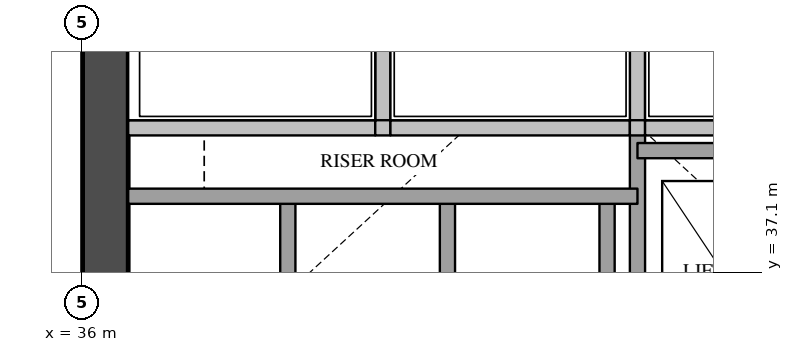
"""IFC4 building model, lengths in metres.
Left out: names, types, materials, properties, quantities, classifications, styles, units other than length and angle.
Written with IfcOpenShell. Run it as: python <this file> out.ifc"""

import sys

from ifc_helpers import new_model, si_unit, direction, frame, frame_2d, origin, place, context, subcontext, project, spatial, rectangle, extrude, element, save


model = new_model("IFC4")
c1 = context("Model", 3, precision=1e-05, world=origin(), true_north=direction((0.0, 1.0)))
c2 = subcontext(c1, "Body", "Model", "MODEL_VIEW")
j1 = project(units=[si_unit("LENGTHUNIT", "METRE"), si_unit("PLANEANGLEUNIT", "RADIAN")], contexts=[c1])
p1 = place(None, origin())
s1 = spatial("IfcSite", under=j1, at=p1, CompositionType="ELEMENT")
p2 = place(p1, origin())
s2 = spatial("IfcBuilding", under=s1, at=p2, CompositionType="ELEMENT")
p3 = place(p2, frame((0.0, 0.0, 42.4)))
s3 = spatial("IfcBuildingStorey", under=s2, at=p3, CompositionType="ELEMENT", Elevation=42.4)
p4 = place(p3, frame((36.3, 29.1, 0.0), z_axis=(0.0, 0.0, 1.0), x_axis=(0.0, 1.0, 0.0)))
e1 = element("IfcWall", 1, at=p4, inside=s3, PredefinedType="SHEAR", context=c2, shape_type="SweptSolid", body=[
    extrude(rectangle(XDim=20.3, YDim=0.6, at=frame_2d((10.15, 0.0))), origin(), (0.0, 0.0, 1.0), 3.5),
])
p5 = place(p4, frame((3.6, 0.0, 0.0)))
e2 = element("IfcOpeningElement", 2, at=p5, cuts=e1, PredefinedType="OPENING", context=c2, shape_type="SweptSolid", body=[
    extrude(rectangle(XDim=1.8, YDim=2.1, at=frame_2d((0.9, 1.05))), frame((0.0, 0.31, 0.0), z_axis=(0.0, -1.0, 0.0), x_axis=(1.0, 0.0, 0.0)), (0.0, 0.0, 1.0), 0.62),
])
p6 = place(p4, frame((16.4, 0.0, 0.0)))
e3 = element("IfcOpeningElement", 3, at=p6, cuts=e1, PredefinedType="OPENING", context=c2, shape_type="SweptSolid", body=[
    extrude(rectangle(XDim=1.0, YDim=2.1, at=frame_2d((0.5, 1.05))), frame((0.0, 0.31, 0.0), z_axis=(0.0, -1.0, 0.0), x_axis=(1.0, 0.0, 0.0)), (0.0, 0.0, 1.0), 0.62),
])
p7 = place(p3, frame((38.7, 34.9, 0.0), z_axis=(0.0, 0.0, 1.0), x_axis=(0.0, 1.0, 0.0)))
e4 = element("IfcWall", 4, at=p7, inside=s3, PredefinedType="SOLIDWALL", context=c2, shape_type="SweptSolid", body=[
    extrude(rectangle(XDim=3.2, YDim=0.2, at=frame_2d((1.6, 0.0))), origin(), (0.0, 0.0, 1.0), 3.5),
])
p8 = place(p3, frame((39.95, 39.0, 0.0), z_axis=(0.0, 0.0, 1.0), x_axis=(0.0, 1.0, 0.0)))
e5 = element("IfcWall", 5, at=p8, inside=s3, PredefinedType="SOLIDWALL", context=c2, shape_type="SweptSolid", body=[
    extrude(rectangle(XDim=1.78, YDim=0.2, at=frame_2d((0.89, 0.0))), origin(), (0.0, 0.0, 1.0), 3.5),
])
for number, where, z_axis, x_axis in (
    (6, (40.8, 34.9, 0.0), (0.0, 0.0, 1.0), (0.0, 1.0, 0.0)),
    (7, (42.9, 34.9, 0.0), (0.0, 0.0, 1.0), (0.0, 1.0, 0.0)),
):
    element("IfcWall", number, at=place(p3, frame(where, z_axis=z_axis, x_axis=x_axis)), inside=s3, PredefinedType="SOLIDWALL", context=c2, shape_type="SweptSolid", body=[
        extrude(rectangle(XDim=3.2, YDim=0.2, at=frame_2d((1.6, 0.0))), origin(), (0.0, 0.0, 1.0), 3.5),
    ])
p9 = place(p3, frame((43.3, 29.1, 0.0), z_axis=(0.0, 0.0, 1.0), x_axis=(0.0, 1.0, 0.0)))
e8 = element("IfcWall", 8, at=p9, inside=s3, PredefinedType="SOLIDWALL", context=c2, shape_type="SweptSolid", body=[
    extrude(rectangle(XDim=9.9, YDim=0.2, at=frame_2d((4.95, 0.0))), origin(), (0.0, 0.0, 1.0), 3.5),
])
p10 = place(p3, frame((43.3, 39.0, 0.0), z_axis=(0.0, 0.0, 1.0), x_axis=(0.0, 1.0, 0.0)))
e9 = element("IfcWall", 9, at=p10, inside=s3, PredefinedType="SOLIDWALL", context=c2, shape_type="SweptSolid", body=[
    extrude(rectangle(XDim=1.78, YDim=0.2, at=frame_2d((0.89, 0.0))), origin(), (0.0, 0.0, 1.0), 3.5),
])
p11 = place(p3, frame((36.6, 38.1, 0.0), z_axis=(0.0, 0.0, 1.0), x_axis=(1.0, 0.0, 0.0)))
e10 = element("IfcWall", 10, at=p11, inside=s3, PredefinedType="SOLIDWALL", context=c2, shape_type="SweptSolid", body=[
    extrude(rectangle(XDim=6.7, YDim=0.2, at=frame_2d((3.35, 0.0))), origin(), (0.0, 0.0, 1.0), 3.5),
])
p12 = place(p3, frame((43.3, 38.7, 0.0), z_axis=(0.0, 0.0, 1.0), x_axis=(1.0, 0.0, 0.0)))
e11 = element("IfcWall", 11, at=p12, inside=s3, PredefinedType="SOLIDWALL", context=c2, shape_type="SweptSolid", body=[
    extrude(rectangle(XDim=4.5, YDim=0.2, at=frame_2d((2.25, 0.0))), origin(), (0.0, 0.0, 1.0), 3.5),
])
p13 = place(p3, frame((36.6, 39.0, 0.0), z_axis=(0.0, 0.0, 1.0), x_axis=(1.0, 0.0, 0.0)))
e12 = element("IfcWall", 12, at=p13, inside=s3, PredefinedType="SOLIDWALL", context=c2, shape_type="SweptSolid", body=[
    extrude(rectangle(XDim=3.25, YDim=0.2, at=frame_2d((1.625, 0.0))), origin(), (0.0, 0.0, 1.0), 3.5),
])
p14 = place(p3, frame((39.85, 39.0, 0.0), z_axis=(0.0, 0.0, 1.0), x_axis=(1.0, 0.0, 0.0)))
e13 = element("IfcWall", 13, at=p14, inside=s3, PredefinedType="SOLIDWALL", context=c2, shape_type="SweptSolid", body=[
    extrude(rectangle(XDim=0.2, YDim=0.2, at=frame_2d((0.1, 0.0))), origin(), (0.0, 0.0, 1.0), 3.5),
])
p15 = place(p3, frame((40.05, 39.0, 0.0), z_axis=(0.0, 0.0, 1.0), x_axis=(1.0, 0.0, 0.0)))
e14 = element("IfcWall", 14, at=p15, inside=s3, PredefinedType="SOLIDWALL", context=c2, shape_type="SweptSolid", body=[
    extrude(rectangle(XDim=3.15, YDim=0.2, at=frame_2d((1.575, 0.0))), origin(), (0.0, 0.0, 1.0), 3.5),
])
p16 = place(p3, frame((43.2, 39.0, 0.0), z_axis=(0.0, 0.0, 1.0), x_axis=(1.0, 0.0, 0.0)))
e15 = element("IfcWall", 15, at=p16, inside=s3, PredefinedType="SOLIDWALL", context=c2, shape_type="SweptSolid", body=[
    extrude(rectangle(XDim=0.2, YDim=0.2, at=frame_2d((0.1, 0.0))), origin(), (0.0, 0.0, 1.0), 3.5),
])
p17 = place(p3, frame((43.4, 39.0, 0.0), z_axis=(0.0, 0.0, 1.0), x_axis=(1.0, 0.0, 0.0)))
e16 = element("IfcWall", 16, at=p17, inside=s3, PredefinedType="SOLIDWALL", context=c2, shape_type="SweptSolid", body=[
    extrude(rectangle(XDim=3.25, YDim=0.2, at=frame_2d((1.625, 0.0))), origin(), (0.0, 0.0, 1.0), 3.5),
])
save(model, sys.argv[1])
